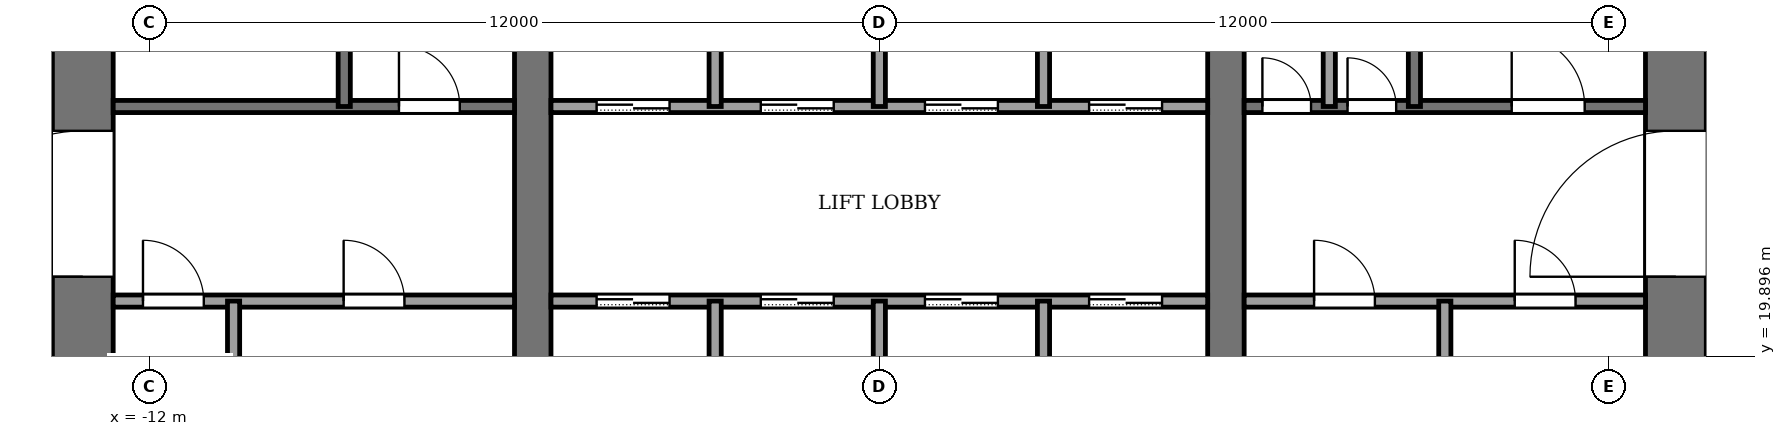
"""IFC4 building model, lengths in metres.
Left out: names, types, materials, properties, quantities, classifications, styles, units other than length and angle.
Written with IfcOpenShell. Run it as: python <this file> out.ifc"""

import sys

from ifc_helpers import new_model, si_unit, direction, frame, frame_2d, origin, place, context, subcontext, project, spatial, rectangle, extrude, element, fill, save


model = new_model("IFC4")
c1 = context("Model", 3, precision=1e-05, world=origin(), true_north=direction((0.0, 1.0)))
c2 = subcontext(c1, "Body", "Model", "MODEL_VIEW")
j1 = project(units=[si_unit("LENGTHUNIT", "METRE"), si_unit("PLANEANGLEUNIT", "RADIAN")], contexts=[c1])
p1 = place(None, origin())
s1 = spatial("IfcSite", under=j1, at=p1, CompositionType="ELEMENT")
p2 = place(p1, origin())
s2 = spatial("IfcBuilding", under=s1, at=p2, CompositionType="ELEMENT")
p3 = place(p2, frame((0.0, 0.0, 142.0)))
s3 = spatial("IfcBuildingStorey", under=s2, at=p3, CompositionType="ELEMENT", Elevation=142.0)
p4 = place(p3, frame((-13.1, 18.4, -0.13), z_axis=(0.0, 0.0, 1.0), x_axis=(0.0, 1.0, 0.0)))
e1 = element("IfcWall", 1, at=p4, inside=s3, PredefinedType="SHEAR", context=c2, shape_type="SweptSolid", body=[
    extrude(rectangle(XDim=19.2, YDim=1.0, at=frame_2d((9.6, 0.0))), origin(), (0.0, 0.0, 1.0), 4.0),
])
p5 = place(p4, frame((2.8, 0.0, 0.13)))
e2 = element("IfcOpeningElement", 2, at=p5, cuts=e1, PredefinedType="OPENING", context=c2, shape_type="SweptSolid", body=[
    extrude(rectangle(XDim=2.4, YDim=2.4, at=frame_2d((1.2, 1.2))), frame((0.0, 0.51, 0.0), z_axis=(0.0, -1.0, 0.0), x_axis=(1.0, 0.0, 0.0)), (0.0, 0.0, 1.0), 1.02),
])
p6 = place(p4, frame((13.4, 0.0, 0.13)))
e3 = element("IfcOpeningElement", 3, at=p6, cuts=e1, PredefinedType="OPENING", context=c2, shape_type="SweptSolid", body=[
    extrude(rectangle(XDim=1.4, YDim=2.2, at=frame_2d((0.7, 1.1))), frame((0.0, 0.51, 0.0), z_axis=(0.0, -1.0, 0.0), x_axis=(1.0, 0.0, 0.0)), (0.0, 0.0, 1.0), 1.02),
])
p7 = place(p3, frame((13.1, 18.4, -0.13), z_axis=(0.0, 0.0, 1.0), x_axis=(0.0, 1.0, 0.0)))
e4 = element("IfcWall", 4, at=p7, inside=s3, PredefinedType="SHEAR", context=c2, shape_type="SweptSolid", body=[
    extrude(rectangle(XDim=19.2, YDim=1.0, at=frame_2d((9.6, 0.0))), origin(), (0.0, 0.0, 1.0), 4.0),
])
p8 = place(p7, frame((2.8, 0.0, 0.13)))
e5 = element("IfcOpeningElement", 5, at=p8, cuts=e4, PredefinedType="OPENING", context=c2, shape_type="SweptSolid", body=[
    extrude(rectangle(XDim=2.4, YDim=2.4, at=frame_2d((1.2, 1.2))), frame((0.0, 0.51, 0.0), z_axis=(0.0, -1.0, 0.0), x_axis=(1.0, 0.0, 0.0)), (0.0, 0.0, 1.0), 1.02),
])
p9 = place(p7, frame((13.3, 0.0, 0.13)))
e6 = element("IfcOpeningElement", 6, at=p9, cuts=e4, PredefinedType="OPENING", context=c2, shape_type="SweptSolid", body=[
    extrude(rectangle(XDim=2.4, YDim=2.4, at=frame_2d((1.2, 1.2))), frame((0.0, 0.51, 0.0), z_axis=(0.0, -1.0, 0.0), x_axis=(1.0, 0.0, 0.0)), (0.0, 0.0, 1.0), 1.02),
])
p10 = place(p3, frame((-5.7, 18.4, -0.13), z_axis=(0.0, 0.0, 1.0), x_axis=(0.0, 1.0, 0.0)))
e7 = element("IfcWall", 7, at=p10, inside=s3, PredefinedType="SHEAR", context=c2, shape_type="SweptSolid", body=[
    extrude(rectangle(XDim=19.2, YDim=0.6, at=frame_2d((9.6, 0.0))), origin(), (0.0, 0.0, 1.0), 4.0),
])
p11 = place(p10, frame((8.35, 0.0, 0.13)))
e8 = element("IfcOpeningElement", 8, at=p11, cuts=e7, PredefinedType="OPENING", context=c2, shape_type="SweptSolid", body=[
    extrude(rectangle(XDim=0.9, YDim=2.1, at=frame_2d((0.45, 1.05))), frame((0.0, 0.31, 0.0), z_axis=(0.0, -1.0, 0.0), x_axis=(1.0, 0.0, 0.0)), (0.0, 0.0, 1.0), 0.62),
])
p12 = place(p3, frame((5.7, 18.4, -0.13), z_axis=(0.0, 0.0, 1.0), x_axis=(0.0, 1.0, 0.0)))
e9 = element("IfcWall", 9, at=p12, inside=s3, PredefinedType="SHEAR", context=c2, shape_type="SweptSolid", body=[
    extrude(rectangle(XDim=19.2, YDim=0.6, at=frame_2d((9.6, 0.0))), origin(), (0.0, 0.0, 1.0), 4.0),
])
p13 = place(p12, frame((13.3, 0.0, 0.13)))
e10 = element("IfcOpeningElement", 10, at=p13, cuts=e9, PredefinedType="OPENING", context=c2, shape_type="SweptSolid", body=[
    extrude(rectangle(XDim=2.4, YDim=2.4, at=frame_2d((1.2, 1.2))), frame((0.0, 0.31, 0.0), z_axis=(0.0, -1.0, 0.0), x_axis=(1.0, 0.0, 0.0)), (0.0, 0.0, 1.0), 0.62),
])
p14 = place(p3, frame((-12.6, 20.8, 0.0), z_axis=(0.0, 0.0, 1.0), x_axis=(1.0, 0.0, 0.0)))
e11 = element("IfcWall", 11, at=p14, inside=s3, PredefinedType="PARTITIONING", context=c2, shape_type="SweptSolid", body=[
    extrude(rectangle(XDim=6.6, YDim=0.2, at=frame_2d((3.3, 0.0))), origin(), (0.0, 0.0, 1.0), 3.87),
])
p15 = place(p14, frame((0.49, 0.0, 0.0)))
e12 = element("IfcOpeningElement", 12, at=p15, cuts=e11, PredefinedType="OPENING", context=c2, shape_type="SweptSolid", body=[
    extrude(rectangle(XDim=1.0, YDim=2.1, at=frame_2d((0.5, 1.05))), frame((0.0, 0.11, 0.0), z_axis=(0.0, -1.0, 0.0), x_axis=(1.0, 0.0, 0.0)), (0.0, 0.0, 1.0), 0.22),
])
p16 = place(p14, frame((3.79, 0.0, 0.0)))
e13 = element("IfcOpeningElement", 13, at=p16, cuts=e11, PredefinedType="OPENING", context=c2, shape_type="SweptSolid", body=[
    extrude(rectangle(XDim=1.0, YDim=2.1, at=frame_2d((0.5, 1.05))), frame((0.0, 0.11, 0.0), z_axis=(0.0, -1.0, 0.0), x_axis=(1.0, 0.0, 0.0)), (0.0, 0.0, 1.0), 0.22),
])
p17 = place(p3, frame((-5.4, 20.8, 0.0), z_axis=(0.0, 0.0, 1.0), x_axis=(1.0, 0.0, 0.0)))
e14 = element("IfcWall", 14, at=p17, inside=s3, PredefinedType="PARTITIONING", context=c2, shape_type="SweptSolid", body=[
    extrude(rectangle(XDim=10.8, YDim=0.2, at=frame_2d((5.4, 0.0))), origin(), (0.0, 0.0, 1.0), 3.87),
])
p18 = place(p17, frame((0.75, 0.0, 0.0)))
e15 = element("IfcOpeningElement", 15, at=p18, cuts=e14, PredefinedType="OPENING", context=c2, shape_type="SweptSolid", body=[
    extrude(rectangle(XDim=1.2, YDim=2.2, at=frame_2d((0.6, 1.1))), frame((0.0, 0.11, 0.0), z_axis=(0.0, -1.0, 0.0), x_axis=(1.0, 0.0, 0.0)), (0.0, 0.0, 1.0), 0.22),
])
p19 = place(p17, frame((3.45, 0.0, 0.0)))
e16 = element("IfcOpeningElement", 16, at=p19, cuts=e14, PredefinedType="OPENING", context=c2, shape_type="SweptSolid", body=[
    extrude(rectangle(XDim=1.2, YDim=2.2, at=frame_2d((0.6, 1.1))), frame((0.0, 0.11, 0.0), z_axis=(0.0, -1.0, 0.0), x_axis=(1.0, 0.0, 0.0)), (0.0, 0.0, 1.0), 0.22),
])
p20 = place(p17, frame((6.15, 0.0, 0.0)))
e17 = element("IfcOpeningElement", 17, at=p20, cuts=e14, PredefinedType="OPENING", context=c2, shape_type="SweptSolid", body=[
    extrude(rectangle(XDim=1.2, YDim=2.2, at=frame_2d((0.6, 1.1))), frame((0.0, 0.11, 0.0), z_axis=(0.0, -1.0, 0.0), x_axis=(1.0, 0.0, 0.0)), (0.0, 0.0, 1.0), 0.22),
])
p21 = place(p17, frame((8.85, 0.0, 0.0)))
e18 = element("IfcOpeningElement", 18, at=p21, cuts=e14, PredefinedType="OPENING", context=c2, shape_type="SweptSolid", body=[
    extrude(rectangle(XDim=1.2, YDim=2.2, at=frame_2d((0.6, 1.1))), frame((0.0, 0.11, 0.0), z_axis=(0.0, -1.0, 0.0), x_axis=(1.0, 0.0, 0.0)), (0.0, 0.0, 1.0), 0.22),
])
p22 = place(p3, frame((6.0, 20.8, 0.0), z_axis=(0.0, 0.0, 1.0), x_axis=(1.0, 0.0, 0.0)))
e19 = element("IfcWall", 19, at=p22, inside=s3, PredefinedType="PARTITIONING", context=c2, shape_type="SweptSolid", body=[
    extrude(rectangle(XDim=6.6, YDim=0.2, at=frame_2d((3.3, 0.0))), origin(), (0.0, 0.0, 1.0), 3.87),
])
p23 = place(p22, frame((1.15, 0.0, 0.0)))
e20 = element("IfcOpeningElement", 20, at=p23, cuts=e19, PredefinedType="OPENING", context=c2, shape_type="SweptSolid", body=[
    extrude(rectangle(XDim=1.0, YDim=2.1, at=frame_2d((0.5, 1.05))), frame((0.0, 0.11, 0.0), z_axis=(0.0, -1.0, 0.0), x_axis=(1.0, 0.0, 0.0)), (0.0, 0.0, 1.0), 0.22),
])
p24 = place(p22, frame((4.45, 0.0, 0.0)))
e21 = element("IfcOpeningElement", 21, at=p24, cuts=e19, PredefinedType="OPENING", context=c2, shape_type="SweptSolid", body=[
    extrude(rectangle(XDim=1.0, YDim=2.1, at=frame_2d((0.5, 1.05))), frame((0.0, 0.11, 0.0), z_axis=(0.0, -1.0, 0.0), x_axis=(1.0, 0.0, 0.0)), (0.0, 0.0, 1.0), 0.22),
])
p25 = place(p3, frame((-12.6, 24.0, 0.0), z_axis=(0.0, 0.0, 1.0), x_axis=(1.0, 0.0, 0.0)))
e22 = element("IfcWall", 22, at=p25, inside=s3, PredefinedType="PARTITIONING", context=c2, shape_type="SweptSolid", body=[
    extrude(rectangle(XDim=6.6, YDim=0.2, at=frame_2d((3.3, 0.0))), origin(), (0.0, 0.0, 1.0), 3.87),
])
p26 = place(p25, frame((4.7, 0.0, 0.0)))
e23 = element("IfcOpeningElement", 23, at=p26, cuts=e22, PredefinedType="OPENING", context=c2, shape_type="SweptSolid", body=[
    extrude(rectangle(XDim=1.0, YDim=2.1, at=frame_2d((0.5, 1.05))), frame((0.0, 0.11, 0.0), z_axis=(0.0, -1.0, 0.0), x_axis=(1.0, 0.0, 0.0)), (0.0, 0.0, 1.0), 0.22),
])
p27 = place(p3, frame((-5.4, 24.0, 0.0), z_axis=(0.0, 0.0, 1.0), x_axis=(1.0, 0.0, 0.0)))
e24 = element("IfcWall", 24, at=p27, inside=s3, PredefinedType="PARTITIONING", context=c2, shape_type="SweptSolid", body=[
    extrude(rectangle(XDim=10.8, YDim=0.2, at=frame_2d((5.4, 0.0))), origin(), (0.0, 0.0, 1.0), 3.87),
])
p28 = place(p27, frame((0.75, 0.0, 0.0)))
e25 = element("IfcOpeningElement", 25, at=p28, cuts=e24, PredefinedType="OPENING", context=c2, shape_type="SweptSolid", body=[
    extrude(rectangle(XDim=1.2, YDim=2.2, at=frame_2d((0.6, 1.1))), frame((0.0, 0.11, 0.0), z_axis=(0.0, -1.0, 0.0), x_axis=(1.0, 0.0, 0.0)), (0.0, 0.0, 1.0), 0.22),
])
p29 = place(p27, frame((3.45, 0.0, 0.0)))
e26 = element("IfcOpeningElement", 26, at=p29, cuts=e24, PredefinedType="OPENING", context=c2, shape_type="SweptSolid", body=[
    extrude(rectangle(XDim=1.2, YDim=2.2, at=frame_2d((0.6, 1.1))), frame((0.0, 0.11, 0.0), z_axis=(0.0, -1.0, 0.0), x_axis=(1.0, 0.0, 0.0)), (0.0, 0.0, 1.0), 0.22),
])
p30 = place(p27, frame((6.15, 0.0, 0.0)))
e27 = element("IfcOpeningElement", 27, at=p30, cuts=e24, PredefinedType="OPENING", context=c2, shape_type="SweptSolid", body=[
    extrude(rectangle(XDim=1.2, YDim=2.2, at=frame_2d((0.6, 1.1))), frame((0.0, 0.11, 0.0), z_axis=(0.0, -1.0, 0.0), x_axis=(1.0, 0.0, 0.0)), (0.0, 0.0, 1.0), 0.22),
])
p31 = place(p27, frame((8.85, 0.0, 0.0)))
e28 = element("IfcOpeningElement", 28, at=p31, cuts=e24, PredefinedType="OPENING", context=c2, shape_type="SweptSolid", body=[
    extrude(rectangle(XDim=1.2, YDim=2.2, at=frame_2d((0.6, 1.1))), frame((0.0, 0.11, 0.0), z_axis=(0.0, -1.0, 0.0), x_axis=(1.0, 0.0, 0.0)), (0.0, 0.0, 1.0), 0.22),
])
p32 = place(p3, frame((6.0, 24.0, 0.0), z_axis=(0.0, 0.0, 1.0), x_axis=(1.0, 0.0, 0.0)))
e29 = element("IfcWall", 29, at=p32, inside=s3, PredefinedType="PARTITIONING", context=c2, shape_type="SweptSolid", body=[
    extrude(rectangle(XDim=6.6, YDim=0.2, at=frame_2d((3.3, 0.0))), origin(), (0.0, 0.0, 1.0), 3.87),
])
p33 = place(p32, frame((0.3, 0.0, 0.0)))
e30 = element("IfcOpeningElement", 30, at=p33, cuts=e29, PredefinedType="OPENING", context=c2, shape_type="SweptSolid", body=[
    extrude(rectangle(XDim=0.8, YDim=2.1, at=frame_2d((0.4, 1.05))), frame((0.0, 0.11, 0.0), z_axis=(0.0, -1.0, 0.0), x_axis=(1.0, 0.0, 0.0)), (0.0, 0.0, 1.0), 0.22),
])
p34 = place(p32, frame((1.7, 0.0, 0.0)))
e31 = element("IfcOpeningElement", 31, at=p34, cuts=e29, PredefinedType="OPENING", context=c2, shape_type="SweptSolid", body=[
    extrude(rectangle(XDim=0.8, YDim=2.1, at=frame_2d((0.4, 1.05))), frame((0.0, 0.11, 0.0), z_axis=(0.0, -1.0, 0.0), x_axis=(1.0, 0.0, 0.0)), (0.0, 0.0, 1.0), 0.22),
])
p35 = place(p32, frame((4.4, 0.0, 0.0)))
e32 = element("IfcOpeningElement", 32, at=p35, cuts=e29, PredefinedType="OPENING", context=c2, shape_type="SweptSolid", body=[
    extrude(rectangle(XDim=1.2, YDim=2.2, at=frame_2d((0.6, 1.1))), frame((0.0, 0.11, 0.0), z_axis=(0.0, -1.0, 0.0), x_axis=(1.0, 0.0, 0.0)), (0.0, 0.0, 1.0), 0.22),
])
p36 = place(p3, frame((-10.62, 18.4, 0.0), z_axis=(0.0, 0.0, 1.0), x_axis=(0.0, 1.0, 0.0)))
e33 = element("IfcWall", 33, at=p36, inside=s3, PredefinedType="PARTITIONING", context=c2, shape_type="SweptSolid", body=[
    extrude(rectangle(XDim=2.4, YDim=0.2, at=frame_2d((1.2, 0.0))), origin(), (0.0, 0.0, 1.0), 3.87),
])
p37 = place(p3, frame((-8.8, 24.0, 0.0), z_axis=(0.0, 0.0, 1.0), x_axis=(0.0, 1.0, 0.0)))
e34 = element("IfcWall", 34, at=p37, inside=s3, PredefinedType="PARTITIONING", context=c2, shape_type="SweptSolid", body=[
    extrude(rectangle(XDim=7.4, YDim=0.2, at=frame_2d((3.7, 0.0))), origin(), (0.0, 0.0, 1.0), 3.87),
])
p38 = place(p3, frame((-2.7, 18.4, 0.0), z_axis=(0.0, 0.0, 1.0), x_axis=(0.0, 1.0, 0.0)))
e35 = element("IfcWall", 35, at=p38, inside=s3, PredefinedType="PARTITIONING", context=c2, shape_type="SweptSolid", body=[
    extrude(rectangle(XDim=2.4, YDim=0.2, at=frame_2d((1.2, 0.0))), origin(), (0.0, 0.0, 1.0), 3.87),
])
p39 = place(p3, frame((-2.7, 24.0, 0.0), z_axis=(0.0, 0.0, 1.0), x_axis=(0.0, 1.0, 0.0)))
e36 = element("IfcWall", 36, at=p39, inside=s3, PredefinedType="PARTITIONING", context=c2, shape_type="SweptSolid", body=[
    extrude(rectangle(XDim=2.4, YDim=0.2, at=frame_2d((1.2, 0.0))), origin(), (0.0, 0.0, 1.0), 3.87),
])
p40 = place(p3, frame((0.0, 18.4, 0.0), z_axis=(0.0, 0.0, 1.0), x_axis=(0.0, 1.0, 0.0)))
e37 = element("IfcWall", 37, at=p40, inside=s3, PredefinedType="PARTITIONING", context=c2, shape_type="SweptSolid", body=[
    extrude(rectangle(XDim=2.4, YDim=0.2, at=frame_2d((1.2, 0.0))), origin(), (0.0, 0.0, 1.0), 3.87),
])
p41 = place(p3, frame((0.0, 24.0, 0.0), z_axis=(0.0, 0.0, 1.0), x_axis=(0.0, 1.0, 0.0)))
e38 = element("IfcWall", 38, at=p41, inside=s3, PredefinedType="PARTITIONING", context=c2, shape_type="SweptSolid", body=[
    extrude(rectangle(XDim=2.4, YDim=0.2, at=frame_2d((1.2, 0.0))), origin(), (0.0, 0.0, 1.0), 3.87),
])
p42 = place(p3, frame((2.7, 18.4, 0.0), z_axis=(0.0, 0.0, 1.0), x_axis=(0.0, 1.0, 0.0)))
e39 = element("IfcWall", 39, at=p42, inside=s3, PredefinedType="PARTITIONING", context=c2, shape_type="SweptSolid", body=[
    extrude(rectangle(XDim=2.4, YDim=0.2, at=frame_2d((1.2, 0.0))), origin(), (0.0, 0.0, 1.0), 3.87),
])
p43 = place(p3, frame((2.7, 24.0, 0.0), z_axis=(0.0, 0.0, 1.0), x_axis=(0.0, 1.0, 0.0)))
e40 = element("IfcWall", 40, at=p43, inside=s3, PredefinedType="PARTITIONING", context=c2, shape_type="SweptSolid", body=[
    extrude(rectangle(XDim=2.4, YDim=0.2, at=frame_2d((1.2, 0.0))), origin(), (0.0, 0.0, 1.0), 3.87),
])
for number, where, z_axis, x_axis in (
    (41, (7.4, 24.0, 0.0), (0.0, 0.0, 1.0), (0.0, 1.0, 0.0)),
    (42, (8.8, 24.0, 0.0), (0.0, 0.0, 1.0), (0.0, 1.0, 0.0)),
):
    element("IfcWall", number, at=place(p3, frame(where, z_axis=z_axis, x_axis=x_axis)), inside=s3, PredefinedType="PARTITIONING", context=c2, shape_type="SweptSolid", body=[
        extrude(rectangle(XDim=7.4, YDim=0.2, at=frame_2d((3.7, 0.0))), origin(), (0.0, 0.0, 1.0), 3.87),
    ])
p44 = place(p3, frame((9.3, 18.4, 0.0), z_axis=(0.0, 0.0, 1.0), x_axis=(0.0, 1.0, 0.0)))
e43 = element("IfcWall", 43, at=p44, inside=s3, PredefinedType="PARTITIONING", context=c2, shape_type="SweptSolid", body=[
    extrude(rectangle(XDim=2.4, YDim=0.2, at=frame_2d((1.2, 0.0))), origin(), (0.0, 0.0, 1.0), 3.87),
])
p45 = place(p18, origin())
e44 = element("IfcDoor", 44, at=p45, inside=s3, OperationType="SLIDING_TO_LEFT", PredefinedType="DOOR", context=c2, shape_type="SweptSolid", body=[
    extrude(rectangle(XDim=1.2, YDim=2.2, at=frame_2d((0.6, 1.1))), frame((0.0, 0.025, 0.0), z_axis=(0.0, -1.0, 0.0), x_axis=(1.0, 0.0, 0.0)), (0.0, 0.0, 1.0), 0.05),
])
fill(e15, e44)
p46 = place(p19, origin())
e45 = element("IfcDoor", 45, at=p46, inside=s3, OperationType="SLIDING_TO_LEFT", PredefinedType="DOOR", context=c2, shape_type="SweptSolid", body=[
    extrude(rectangle(XDim=1.2, YDim=2.2, at=frame_2d((0.6, 1.1))), frame((0.0, 0.025, 0.0), z_axis=(0.0, -1.0, 0.0), x_axis=(1.0, 0.0, 0.0)), (0.0, 0.0, 1.0), 0.05),
])
fill(e16, e45)
p47 = place(p20, origin())
e46 = element("IfcDoor", 46, at=p47, inside=s3, OperationType="SLIDING_TO_LEFT", PredefinedType="DOOR", context=c2, shape_type="SweptSolid", body=[
    extrude(rectangle(XDim=1.2, YDim=2.2, at=frame_2d((0.6, 1.1))), frame((0.0, 0.025, 0.0), z_axis=(0.0, -1.0, 0.0), x_axis=(1.0, 0.0, 0.0)), (0.0, 0.0, 1.0), 0.05),
])
fill(e17, e46)
p48 = place(p21, origin())
e47 = element("IfcDoor", 47, at=p48, inside=s3, OperationType="SLIDING_TO_LEFT", PredefinedType="DOOR", context=c2, shape_type="SweptSolid", body=[
    extrude(rectangle(XDim=1.2, YDim=2.2, at=frame_2d((0.6, 1.1))), frame((0.0, 0.025, 0.0), z_axis=(0.0, -1.0, 0.0), x_axis=(1.0, 0.0, 0.0)), (0.0, 0.0, 1.0), 0.05),
])
fill(e18, e47)
p49 = place(p28, origin())
e48 = element("IfcDoor", 48, at=p49, inside=s3, OperationType="SLIDING_TO_LEFT", PredefinedType="DOOR", context=c2, shape_type="SweptSolid", body=[
    extrude(rectangle(XDim=1.2, YDim=2.2, at=frame_2d((0.6, 1.1))), frame((0.0, 0.025, 0.0), z_axis=(0.0, -1.0, 0.0), x_axis=(1.0, 0.0, 0.0)), (0.0, 0.0, 1.0), 0.05),
])
fill(e25, e48)
p50 = place(p29, origin())
e49 = element("IfcDoor", 49, at=p50, inside=s3, OperationType="SLIDING_TO_LEFT", PredefinedType="DOOR", context=c2, shape_type="SweptSolid", body=[
    extrude(rectangle(XDim=1.2, YDim=2.2, at=frame_2d((0.6, 1.1))), frame((0.0, 0.025, 0.0), z_axis=(0.0, -1.0, 0.0), x_axis=(1.0, 0.0, 0.0)), (0.0, 0.0, 1.0), 0.05),
])
fill(e26, e49)
p51 = place(p30, origin())
e50 = element("IfcDoor", 50, at=p51, inside=s3, OperationType="SLIDING_TO_LEFT", PredefinedType="DOOR", context=c2, shape_type="SweptSolid", body=[
    extrude(rectangle(XDim=1.2, YDim=2.2, at=frame_2d((0.6, 1.1))), frame((0.0, 0.025, 0.0), z_axis=(0.0, -1.0, 0.0), x_axis=(1.0, 0.0, 0.0)), (0.0, 0.0, 1.0), 0.05),
])
fill(e27, e50)
p52 = place(p31, origin())
e51 = element("IfcDoor", 51, at=p52, inside=s3, OperationType="SLIDING_TO_LEFT", PredefinedType="DOOR", context=c2, shape_type="SweptSolid", body=[
    extrude(rectangle(XDim=1.2, YDim=2.2, at=frame_2d((0.6, 1.1))), frame((0.0, 0.025, 0.0), z_axis=(0.0, -1.0, 0.0), x_axis=(1.0, 0.0, 0.0)), (0.0, 0.0, 1.0), 0.05),
])
fill(e28, e51)
p53 = place(p15, origin())
e52 = element("IfcDoor", 52, at=p53, inside=s3, OperationType="SINGLE_SWING_RIGHT", PredefinedType="DOOR", context=c2, shape_type="SweptSolid", body=[
    extrude(rectangle(XDim=1.0, YDim=2.1, at=frame_2d((0.5, 1.05))), frame((0.0, 0.025, 0.0), z_axis=(0.0, -1.0, 0.0), x_axis=(1.0, 0.0, 0.0)), (0.0, 0.0, 1.0), 0.05),
])
fill(e12, e52)
p54 = place(p16, origin())
e53 = element("IfcDoor", 53, at=p54, inside=s3, OperationType="SINGLE_SWING_RIGHT", PredefinedType="DOOR", context=c2, shape_type="SweptSolid", body=[
    extrude(rectangle(XDim=1.0, YDim=2.1, at=frame_2d((0.5, 1.05))), frame((0.0, 0.025, 0.0), z_axis=(0.0, -1.0, 0.0), x_axis=(1.0, 0.0, 0.0)), (0.0, 0.0, 1.0), 0.05),
])
fill(e13, e53)
p55 = place(p23, origin())
e54 = element("IfcDoor", 54, at=p55, inside=s3, OperationType="SINGLE_SWING_LEFT", PredefinedType="DOOR", context=c2, shape_type="SweptSolid", body=[
    extrude(rectangle(XDim=1.0, YDim=2.1, at=frame_2d((0.5, 1.05))), frame((0.0, 0.025, 0.0), z_axis=(0.0, -1.0, 0.0), x_axis=(1.0, 0.0, 0.0)), (0.0, 0.0, 1.0), 0.05),
])
fill(e20, e54)
p56 = place(p24, origin())
e55 = element("IfcDoor", 55, at=p56, inside=s3, OperationType="SINGLE_SWING_LEFT", PredefinedType="DOOR", context=c2, shape_type="SweptSolid", body=[
    extrude(rectangle(XDim=1.0, YDim=2.1, at=frame_2d((0.5, 1.05))), frame((0.0, 0.025, 0.0), z_axis=(0.0, -1.0, 0.0), x_axis=(1.0, 0.0, 0.0)), (0.0, 0.0, 1.0), 0.05),
])
fill(e21, e55)
p57 = place(p26, origin())
e56 = element("IfcDoor", 56, at=p57, inside=s3, OperationType="SINGLE_SWING_RIGHT", PredefinedType="DOOR", context=c2, shape_type="SweptSolid", body=[
    extrude(rectangle(XDim=1.0, YDim=2.1, at=frame_2d((0.5, 1.05))), frame((0.0, 0.025, 0.0), z_axis=(0.0, -1.0, 0.0), x_axis=(1.0, 0.0, 0.0)), (0.0, 0.0, 1.0), 0.05),
])
fill(e23, e56)
p58 = place(p33, origin())
e57 = element("IfcDoor", 57, at=p58, inside=s3, OperationType="SINGLE_SWING_RIGHT", PredefinedType="DOOR", context=c2, shape_type="SweptSolid", body=[
    extrude(rectangle(XDim=0.8, YDim=2.1, at=frame_2d((0.4, 1.05))), frame((0.0, 0.025, 0.0), z_axis=(0.0, -1.0, 0.0), x_axis=(1.0, 0.0, 0.0)), (0.0, 0.0, 1.0), 0.05),
])
fill(e30, e57)
p59 = place(p34, origin())
e58 = element("IfcDoor", 58, at=p59, inside=s3, OperationType="SINGLE_SWING_LEFT", PredefinedType="DOOR", context=c2, shape_type="SweptSolid", body=[
    extrude(rectangle(XDim=0.8, YDim=2.1, at=frame_2d((0.4, 1.05))), frame((0.0, 0.025, 0.0), z_axis=(0.0, -1.0, 0.0), x_axis=(1.0, 0.0, 0.0)), (0.0, 0.0, 1.0), 0.05),
])
fill(e31, e58)
p60 = place(p35, origin())
e59 = element("IfcDoor", 59, at=p60, inside=s3, OperationType="SINGLE_SWING_RIGHT", PredefinedType="DOOR", context=c2, shape_type="SweptSolid", body=[
    extrude(rectangle(XDim=1.2, YDim=2.2, at=frame_2d((0.6, 1.1))), frame((0.0, 0.025, 0.0), z_axis=(0.0, -1.0, 0.0), x_axis=(1.0, 0.0, 0.0)), (0.0, 0.0, 1.0), 0.05),
])
fill(e32, e59)
p61 = place(p5, origin())
e60 = element("IfcDoor", 60, at=p61, inside=s3, OperationType="DOUBLE_DOOR_SINGLE_SWING", PredefinedType="DOOR", context=c2, shape_type="SweptSolid", body=[
    extrude(rectangle(XDim=2.4, YDim=2.4, at=frame_2d((1.2, 1.2))), frame((0.0, 0.025, 0.0), z_axis=(0.0, -1.0, 0.0), x_axis=(1.0, 0.0, 0.0)), (0.0, 0.0, 1.0), 0.05),
])
fill(e2, e60)
p62 = place(p8, origin())
e61 = element("IfcDoor", 61, at=p62, inside=s3, OperationType="DOUBLE_DOOR_SINGLE_SWING", PredefinedType="DOOR", context=c2, shape_type="SweptSolid", body=[
    extrude(rectangle(XDim=2.4, YDim=2.4, at=frame_2d((1.2, 1.2))), frame((0.0, 0.025, 0.0), z_axis=(0.0, -1.0, 0.0), x_axis=(1.0, 0.0, 0.0)), (0.0, 0.0, 1.0), 0.05),
])
fill(e5, e61)
save(model, sys.argv[1])
